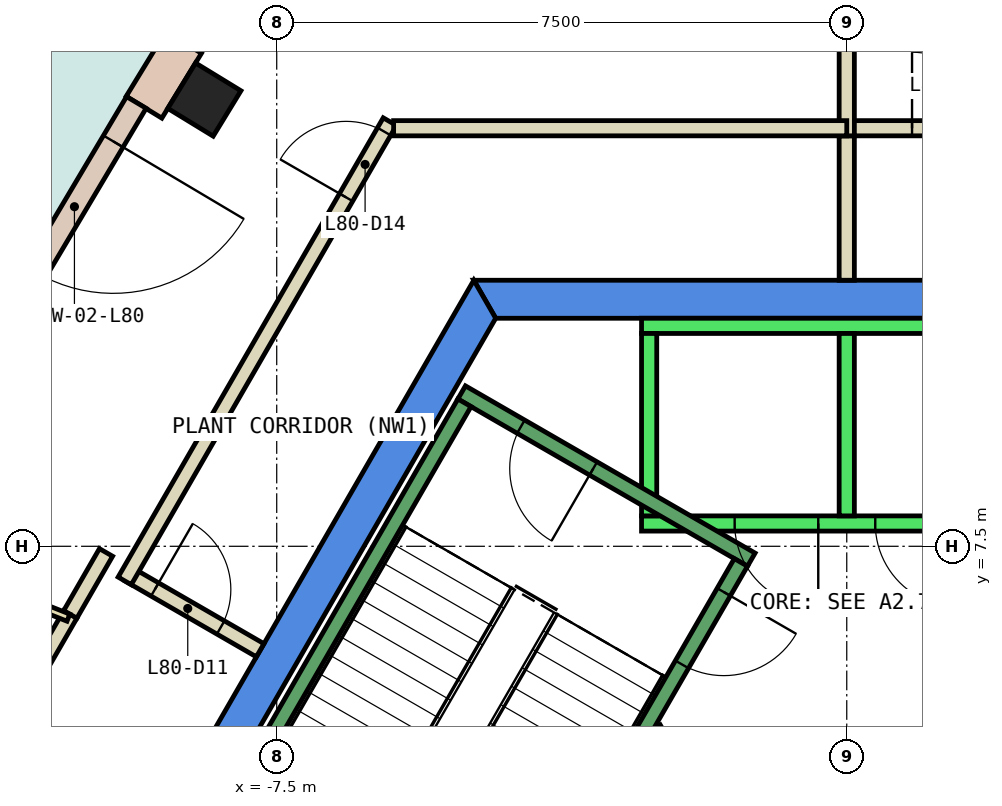
"""IFC4 building model, lengths in metres.
Left out: names, types, materials, properties, quantities, classifications, styles, units other than length and angle.
Written with IfcOpenShell. Run it as: python <this file> out.ifc"""

import sys

from ifc_helpers import new_model, si_unit, direction, frame, frame_2d, origin, origin_2d, place, context, subcontext, project, spatial, polyline, rectangle, outline, extrude, element, fill, save


model = new_model("IFC4")
c1 = context("Model", 3, precision=1e-05, world=origin(), true_north=direction((0.0, 1.0)))
c2 = subcontext(c1, "Body", "Model", "MODEL_VIEW")
j1 = project(units=[si_unit("LENGTHUNIT", "METRE"), si_unit("PLANEANGLEUNIT", "RADIAN")], contexts=[c1])
p1 = place(None, origin())
s1 = spatial("IfcSite", under=j1, at=p1, CompositionType="ELEMENT")
p2 = place(p1, origin())
s2 = spatial("IfcBuilding", under=s1, at=p2, CompositionType="ELEMENT")
p3 = place(p2, frame((0.0, 0.0, 340.4)))
s3 = spatial("IfcBuildingStorey", under=s2, at=p3, CompositionType="ELEMENT", Elevation=340.4)
p4 = place(p3, frame((-8.452, 13.377, 0.0), z_axis=(0.0, 0.0, 1.0), x_axis=(0.521545830745, 0.853223268806, 0.0)))
e1 = element("IfcColumn", 1, at=p4, inside=s3, PredefinedType="COLUMN", context=c2, shape_type="SweptSolid", body=[
    extrude(rectangle(XDim=0.7, YDim=0.7, at=origin_2d()), origin(), (0.0, 0.0, 1.0), 4.15),
])
p5 = place(p3, frame((0.0, 0.0, -0.45)))
e2 = element("IfcWall", 2, at=p5, inside=s3, PredefinedType="SHEAR", context=c2, shape_type="SweptSolid", body=[
    extrude(outline(polyline([(4.907, 11.0), (-4.907, 11.0), (-4.619, 10.5), (4.619, 10.5), (4.907, 11.0)])), origin(), (0.0, 0.0, 1.0), 4.6),
])
p6 = place(p3, frame((0.0, 0.0, -0.45)))
e3 = element("IfcWall", 3, at=p6, inside=s3, PredefinedType="SHEAR", context=c2, shape_type="SweptSolid", body=[
    extrude(outline(polyline([(-9.236, 3.502), (-8.803, 3.253), (-4.619, 10.5), (-4.907, 11.0), (-9.236, 3.502)])), origin(), (0.0, 0.0, 1.0), 4.6),
])
p7 = place(p3, frame((-8.725, 14.129, 0.0), z_axis=(0.0, 0.0, 1.0), x_axis=(-0.521232636172, -0.853414634857, 0.0)))
e4 = element("IfcWall", 4, at=p7, inside=s3, PredefinedType="STANDARD", context=c2, shape_type="SweptSolid", body=[
    extrude(rectangle(XDim=1.0, YDim=0.55, at=frame_2d((0.5, 0.0))), origin(), (0.0, 0.0, 1.0), 4.15),
])
p8 = place(p3, frame((-9.347, 13.339, 0.0), z_axis=(0.0, 0.0, 1.0), x_axis=(-0.510686403068, -0.859767060152, 0.0)))
e5 = element("IfcWall", 5, at=p8, inside=s3, PredefinedType="STANDARD", context=c2, shape_type="SweptSolid", body=[
    extrude(rectangle(XDim=6.38, YDim=0.3, at=frame_2d((3.19, 0.0))), origin(), (0.0, 0.0, 1.0), 4.15),
])
p9 = place(p8, frame((0.595, 0.0, 0.0)))
e6 = element("IfcOpeningElement", 6, at=p9, cuts=e5, PredefinedType="OPENING", context=c2, shape_type="SweptSolid", body=[
    extrude(rectangle(XDim=2.0, YDim=2.4, at=frame_2d((1.0, 1.2))), frame((0.0, 0.16, 0.0), z_axis=(0.0, -1.0, 0.0), x_axis=(1.0, 0.0, 0.0)), (0.0, 0.0, 1.0), 0.32),
])
p10 = place(p8, frame((3.785, 0.0, 0.9)))
e7 = element("IfcOpeningElement", 7, at=p10, cuts=e5, PredefinedType="OPENING", context=c2, shape_type="SweptSolid", body=[
    extrude(rectangle(XDim=2.0, YDim=3.0, at=frame_2d((1.0, 1.5))), frame((0.0, 0.16, 0.0), z_axis=(0.0, -1.0, 0.0), x_axis=(1.0, 0.0, 0.0)), (0.0, 0.0, 1.0), 0.32),
])
p11 = place(p3, frame((-2.54, 5.1, 0.0), z_axis=(0.0, 0.0, 1.0), x_axis=(0.499925051871, -0.866068670783, 0.0)))
e8 = element("IfcWall", 8, at=p11, inside=s3, PredefinedType="PARTITIONING", context=c2, shape_type="SweptSolid", body=[
    extrude(rectangle(XDim=5.181, YDim=0.2, at=frame_2d((2.59, 0.0))), origin(), (0.0, 0.0, 1.0), 4.15),
])
p12 = place(p11, frame((2.04, 0.0, 0.0)))
e9 = element("IfcOpeningElement", 9, at=p12, cuts=e8, PredefinedType="OPENING", context=c2, shape_type="SweptSolid", body=[
    extrude(rectangle(XDim=1.0, YDim=2.1, at=frame_2d((0.5, 1.05))), frame((0.0, 0.11, 0.0), z_axis=(0.0, -1.0, 0.0), x_axis=(1.0, 0.0, 0.0)), (0.0, 0.0, 1.0), 0.22),
])
p13 = place(p3, frame((0.0, 13.0, 0.0), z_axis=(0.0, 0.0, 1.0), x_axis=(1.0, 0.0, 0.0)))
e10 = element("IfcWall", 10, at=p13, inside=s3, PredefinedType="PARTITIONING", context=c2, shape_type="SweptSolid", body=[
    extrude(rectangle(XDim=2.838, YDim=0.2, at=frame_2d((1.419, 0.0))), origin(), (0.0, 0.0, 1.0), 4.15),
])
p14 = place(p13, frame((0.859, 0.0, 0.0)))
e11 = element("IfcOpeningElement", 11, at=p14, cuts=e10, PredefinedType="OPENING", context=c2, shape_type="SweptSolid", body=[
    extrude(rectangle(XDim=1.0, YDim=2.1, at=frame_2d((0.5, 1.05))), frame((0.0, 0.11, 0.0), z_axis=(0.0, -1.0, 0.0), x_axis=(1.0, 0.0, 0.0)), (0.0, 0.0, 1.0), 0.22),
])
p15 = place(p3, frame((0.0, 11.0, 0.0), z_axis=(0.0, 0.0, 1.0), x_axis=(0.0, 1.0, 0.0)))
e12 = element("IfcWall", 12, at=p15, inside=s3, PredefinedType="PARTITIONING", context=c2, shape_type="SweptSolid", body=[
    extrude(rectangle(XDim=1.9, YDim=0.2, at=frame_2d((0.95, 0.0))), origin(), (0.0, 0.0, 1.0), 4.15),
])
p16 = place(p3, frame((0.0, 12.9, 0.0), z_axis=(0.0, 0.0, 1.0), x_axis=(0.0, 1.0, 0.0)))
e13 = element("IfcWall", 13, at=p16, inside=s3, PredefinedType="PARTITIONING", context=c2, shape_type="SweptSolid", body=[
    extrude(rectangle(XDim=7.756, YDim=0.2, at=frame_2d((3.878, 0.0))), origin(), (0.0, 0.0, 1.0), 4.15),
])
p17 = place(p3, frame((-9.45, 7.132, 0.0), z_axis=(0.0, 0.0, 1.0), x_axis=(0.866010750942, -0.50002537861, 0.0)))
e14 = element("IfcWall", 14, at=p17, inside=s3, PredefinedType="PARTITIONING", context=c2, shape_type="SweptSolid", body=[
    extrude(rectangle(XDim=2.0, YDim=0.2, at=frame_2d((1.0, 0.0))), origin(), (0.0, 0.0, 1.0), 4.15),
])
p18 = place(p17, frame((0.4, 0.0, 0.0)))
e15 = element("IfcOpeningElement", 15, at=p18, cuts=e14, PredefinedType="OPENING", context=c2, shape_type="SweptSolid", body=[
    extrude(rectangle(XDim=1.0, YDim=2.1, at=frame_2d((0.5, 1.05))), frame((0.0, 0.11, 0.0), z_axis=(0.0, -1.0, 0.0), x_axis=(1.0, 0.0, 0.0)), (0.0, 0.0, 1.0), 0.22),
])
p19 = place(p3, frame((-13.346, 1.183, 0.0), z_axis=(0.0, 0.0, 1.0), x_axis=(0.5000150537, 0.866016712352, 0.0)))
e16 = element("IfcWall", 16, at=p19, inside=s3, PredefinedType="PARTITIONING", context=c2, shape_type="SweptSolid", body=[
    extrude(rectangle(XDim=6.26, YDim=0.2, at=frame_2d((3.13, 0.0))), origin(), (0.0, 0.0, 1.0), 4.15),
])
p20 = place(p19, frame((1.18, 0.0, 0.0)))
e17 = element("IfcOpeningElement", 17, at=p20, cuts=e16, PredefinedType="OPENING", context=c2, shape_type="SweptSolid", body=[
    extrude(rectangle(XDim=1.0, YDim=2.1, at=frame_2d((0.5, 1.05))), frame((0.0, 0.11, 0.0), z_axis=(0.0, -1.0, 0.0), x_axis=(1.0, 0.0, 0.0)), (0.0, 0.0, 1.0), 0.22),
])
p21 = place(p3, frame((-10.216, 6.604, 0.0), z_axis=(0.0, 0.0, 1.0), x_axis=(0.499572668549, 0.866271983178, 0.0)))
e18 = element("IfcWall", 18, at=p21, inside=s3, PredefinedType="PARTITIONING", context=c2, shape_type="SweptSolid", body=[
    extrude(rectangle(XDim=0.941, YDim=0.2, at=frame_2d((0.47, 0.0))), origin(), (0.0, 0.0, 1.0), 4.15),
])
p22 = place(p3, frame((-9.5, 7.045, 0.0), z_axis=(0.0, 0.0, 1.0), x_axis=(0.499966812698, 0.866044563634, 0.0)))
e19 = element("IfcWall", 19, at=p22, inside=s3, PredefinedType="PARTITIONING", context=c2, shape_type="SweptSolid", body=[
    extrude(rectangle(XDim=6.977, YDim=0.2, at=frame_2d((3.488, 0.0))), origin(), (0.0, 0.0, 1.0), 4.15),
])
p23 = place(p22, frame((5.826, 0.0, 0.0)))
e20 = element("IfcOpeningElement", 20, at=p23, cuts=e19, PredefinedType="OPENING", context=c2, shape_type="SweptSolid", body=[
    extrude(rectangle(XDim=1.0, YDim=2.1, at=frame_2d((0.5, 1.05))), frame((0.0, 0.11, 0.0), z_axis=(0.0, -1.0, 0.0), x_axis=(1.0, 0.0, 0.0)), (0.0, 0.0, 1.0), 0.22),
])
p24 = place(p3, frame((-5.962, 13.0, 0.0), z_axis=(0.0, 0.0, 1.0), x_axis=(1.0, 0.0, 0.0)))
e21 = element("IfcWall", 21, at=p24, inside=s3, PredefinedType="PARTITIONING", context=c2, shape_type="SweptSolid", body=[
    extrude(rectangle(XDim=5.962, YDim=0.2, at=frame_2d((2.981, 0.0))), origin(), (0.0, 0.0, 1.0), 4.15),
])
p25 = place(p3, frame((-11.726, 7.15, 0.0), z_axis=(0.0, 0.0, 1.0), x_axis=(0.929589639936, -0.36859612223, 0.0)))
e22 = element("IfcWall", 22, at=p25, inside=s3, PredefinedType="PARTITIONING", context=c2, shape_type="SweptSolid", body=[
    extrude(rectangle(XDim=1.598, YDim=0.1, at=frame_2d((0.799, 0.0))), origin(), (0.0, 0.0, 1.0), 4.15),
])
p26 = place(p3, frame((2.7, 7.8, 0.0), z_axis=(0.0, 0.0, 1.0), x_axis=(-1.0, 0.0, 0.0)))
e23 = element("IfcWall", 23, at=p26, inside=s3, PredefinedType="STANDARD", context=c2, shape_type="SweptSolid", body=[
    extrude(rectangle(XDim=5.4, YDim=0.2, at=frame_2d((2.7, 0.0))), origin(), (0.0, 0.0, 1.0), 4.15),
])
p27 = place(p26, frame((1.225, 0.0, 0.0)))
e24 = element("IfcOpeningElement", 24, at=p27, cuts=e23, PredefinedType="OPENING", context=c2, shape_type="SweptSolid", body=[
    extrude(rectangle(XDim=1.1, YDim=2.1, at=frame_2d((0.55, 1.05))), frame((0.0, 0.11, 0.0), z_axis=(0.0, -1.0, 0.0), x_axis=(1.0, 0.0, 0.0)), (0.0, 0.0, 1.0), 0.22),
])
p28 = place(p26, frame((3.075, 0.0, 0.0)))
e25 = element("IfcOpeningElement", 25, at=p28, cuts=e23, PredefinedType="OPENING", context=c2, shape_type="SweptSolid", body=[
    extrude(rectangle(XDim=1.1, YDim=2.1, at=frame_2d((0.55, 1.05))), frame((0.0, 0.11, 0.0), z_axis=(0.0, -1.0, 0.0), x_axis=(1.0, 0.0, 0.0)), (0.0, 0.0, 1.0), 0.22),
])
p29 = place(p3, frame((2.7, 10.4, 0.0), z_axis=(0.0, 0.0, 1.0), x_axis=(-1.0, 0.0, 0.0)))
e26 = element("IfcWall", 26, at=p29, inside=s3, PredefinedType="STANDARD", context=c2, shape_type="SweptSolid", body=[
    extrude(rectangle(XDim=5.4, YDim=0.2, at=frame_2d((2.7, 0.0))), origin(), (0.0, 0.0, 1.0), 4.15),
])
for number, where, z_axis, x_axis in (
    (27, (0.0, 7.9, 0.0), (0.0, 0.0, 1.0), (0.0, 1.0, 0.0)),
    (28, (-2.6, 7.9, 0.0), (0.0, 0.0, 1.0), (0.0, 1.0, 0.0)),
):
    element("IfcWall", number, at=place(p3, frame(where, z_axis=z_axis, x_axis=x_axis)), inside=s3, PredefinedType="STANDARD", context=c2, shape_type="SweptSolid", body=[
        extrude(rectangle(XDim=2.4, YDim=0.2, at=frame_2d((1.2, 0.0))), origin(), (0.0, 0.0, 1.0), 4.15),
    ])
p30 = place(p3, frame((-1.256, 7.324, 0.0), z_axis=(0.0, 0.0, 1.0), x_axis=(-0.866046073146, 0.499964197906, 0.0)))
e29 = element("IfcWall", 29, at=p30, inside=s3, PredefinedType="STANDARD", context=c2, shape_type="SweptSolid", body=[
    extrude(rectangle(XDim=4.4, YDim=0.2, at=frame_2d((2.2, 0.0))), origin(), (0.0, 0.0, 1.0), 4.15),
])
p31 = place(p30, frame((2.4, 0.0, 0.0)))
e30 = element("IfcOpeningElement", 30, at=p31, cuts=e29, PredefinedType="OPENING", context=c2, shape_type="SweptSolid", body=[
    extrude(rectangle(XDim=1.1, YDim=2.2, at=frame_2d((0.55, 1.1))), frame((0.0, 0.11, 0.0), z_axis=(0.0, -1.0, 0.0), x_axis=(1.0, 0.0, 0.0)), (0.0, 0.0, 1.0), 0.22),
])
p32 = place(p3, frame((-1.393, 7.288, 0.0), z_axis=(0.0, 0.0, 1.0), x_axis=(-0.499963383562, -0.866046543262, 0.0)))
e31 = element("IfcWall", 31, at=p32, inside=s3, PredefinedType="STANDARD", context=c2, shape_type="SweptSolid", body=[
    extrude(rectangle(XDim=6.9, YDim=0.2, at=frame_2d((3.45, 0.0))), origin(), (0.0, 0.0, 1.0), 4.15),
])
p33 = place(p32, frame((0.45, 0.0, 0.0)))
e32 = element("IfcOpeningElement", 32, at=p33, cuts=e31, PredefinedType="OPENING", context=c2, shape_type="SweptSolid", body=[
    extrude(rectangle(XDim=1.1, YDim=2.2, at=frame_2d((0.55, 1.1))), frame((0.0, 0.11, 0.0), z_axis=(0.0, -1.0, 0.0), x_axis=(1.0, 0.0, 0.0)), (0.0, 0.0, 1.0), 0.22),
])
p34 = place(p3, frame((-5.03, 9.388, 0.0), z_axis=(0.0, 0.0, 1.0), x_axis=(-0.499978703459, -0.866037698999, 0.0)))
e33 = element("IfcWall", 33, at=p34, inside=s3, PredefinedType="STANDARD", context=c2, shape_type="SweptSolid", body=[
    extrude(rectangle(XDim=6.9, YDim=0.2, at=frame_2d((3.45, 0.0))), origin(), (0.0, 0.0, 1.0), 4.15),
])
p35 = place(p9, origin())
e34 = element("IfcDoor", 34, at=p35, inside=s3, OperationType="SLIDING_TO_LEFT", PredefinedType="DOOR", context=c2, shape_type="SweptSolid", body=[
    extrude(rectangle(XDim=2.0, YDim=2.4, at=frame_2d((1.0, 1.2))), frame((0.0, 0.025, 0.0), z_axis=(0.0, -1.0, 0.0), x_axis=(1.0, 0.0, 0.0)), (0.0, 0.0, 1.0), 0.05),
])
fill(e6, e34)
p36 = place(p14, origin())
e35 = element("IfcDoor", 35, at=p36, inside=s3, OperationType="SINGLE_SWING_LEFT", PredefinedType="DOOR", context=c2, shape_type="SweptSolid", body=[
    extrude(rectangle(XDim=1.0, YDim=2.1, at=frame_2d((0.5, 1.05))), frame((0.0, 0.025, 0.0), z_axis=(0.0, -1.0, 0.0), x_axis=(1.0, 0.0, 0.0)), (0.0, 0.0, 1.0), 0.05),
])
fill(e11, e35)
p37 = place(p18, origin())
e36 = element("IfcDoor", 36, at=p37, inside=s3, OperationType="SINGLE_SWING_LEFT", PredefinedType="DOOR", context=c2, shape_type="SweptSolid", body=[
    extrude(rectangle(XDim=1.0, YDim=2.1, at=frame_2d((0.5, 1.05))), frame((0.0, 0.025, 0.0), z_axis=(0.0, -1.0, 0.0), x_axis=(1.0, 0.0, 0.0)), (0.0, 0.0, 1.0), 0.05),
])
fill(e15, e36)
p38 = place(p23, origin())
e37 = element("IfcDoor", 37, at=p38, inside=s3, OperationType="SINGLE_SWING_RIGHT", PredefinedType="DOOR", context=c2, shape_type="SweptSolid", body=[
    extrude(rectangle(XDim=1.0, YDim=2.1, at=frame_2d((0.5, 1.05))), frame((0.0, 0.025, 0.0), z_axis=(0.0, -1.0, 0.0), x_axis=(1.0, 0.0, 0.0)), (0.0, 0.0, 1.0), 0.05),
])
fill(e20, e37)
p39 = place(p27, origin())
e38 = element("IfcDoor", 38, at=p39, inside=s3, OperationType="SLIDING_TO_LEFT", PredefinedType="DOOR", context=c2, shape_type="SweptSolid", body=[
    extrude(rectangle(XDim=1.1, YDim=2.1, at=frame_2d((0.55, 1.05))), frame((0.0, 0.025, 0.0), z_axis=(0.0, -1.0, 0.0), x_axis=(1.0, 0.0, 0.0)), (0.0, 0.0, 1.0), 0.05),
])
fill(e24, e38)
p40 = place(p28, origin())
e39 = element("IfcDoor", 39, at=p40, inside=s3, OperationType="SLIDING_TO_LEFT", PredefinedType="DOOR", context=c2, shape_type="SweptSolid", body=[
    extrude(rectangle(XDim=1.1, YDim=2.1, at=frame_2d((0.55, 1.05))), frame((0.0, 0.025, 0.0), z_axis=(0.0, -1.0, 0.0), x_axis=(1.0, 0.0, 0.0)), (0.0, 0.0, 1.0), 0.05),
])
fill(e25, e39)
p41 = place(p33, origin())
e40 = element("IfcDoor", 40, at=p41, inside=s3, OperationType="SINGLE_SWING_LEFT", PredefinedType="DOOR", context=c2, shape_type="SweptSolid", body=[
    extrude(rectangle(XDim=1.1, YDim=2.2, at=frame_2d((0.55, 1.1))), frame((0.0, 0.025, 0.0), z_axis=(0.0, -1.0, 0.0), x_axis=(1.0, 0.0, 0.0)), (0.0, 0.0, 1.0), 0.05),
])
fill(e32, e40)
p42 = place(p31, origin())
e41 = element("IfcDoor", 41, at=p42, inside=s3, OperationType="SINGLE_SWING_LEFT", PredefinedType="DOOR", context=c2, shape_type="SweptSolid", body=[
    extrude(rectangle(XDim=1.1, YDim=2.2, at=frame_2d((0.55, 1.1))), frame((0.0, 0.025, 0.0), z_axis=(0.0, -1.0, 0.0), x_axis=(1.0, 0.0, 0.0)), (0.0, 0.0, 1.0), 0.05),
])
fill(e30, e41)
save(model, sys.argv[1])
